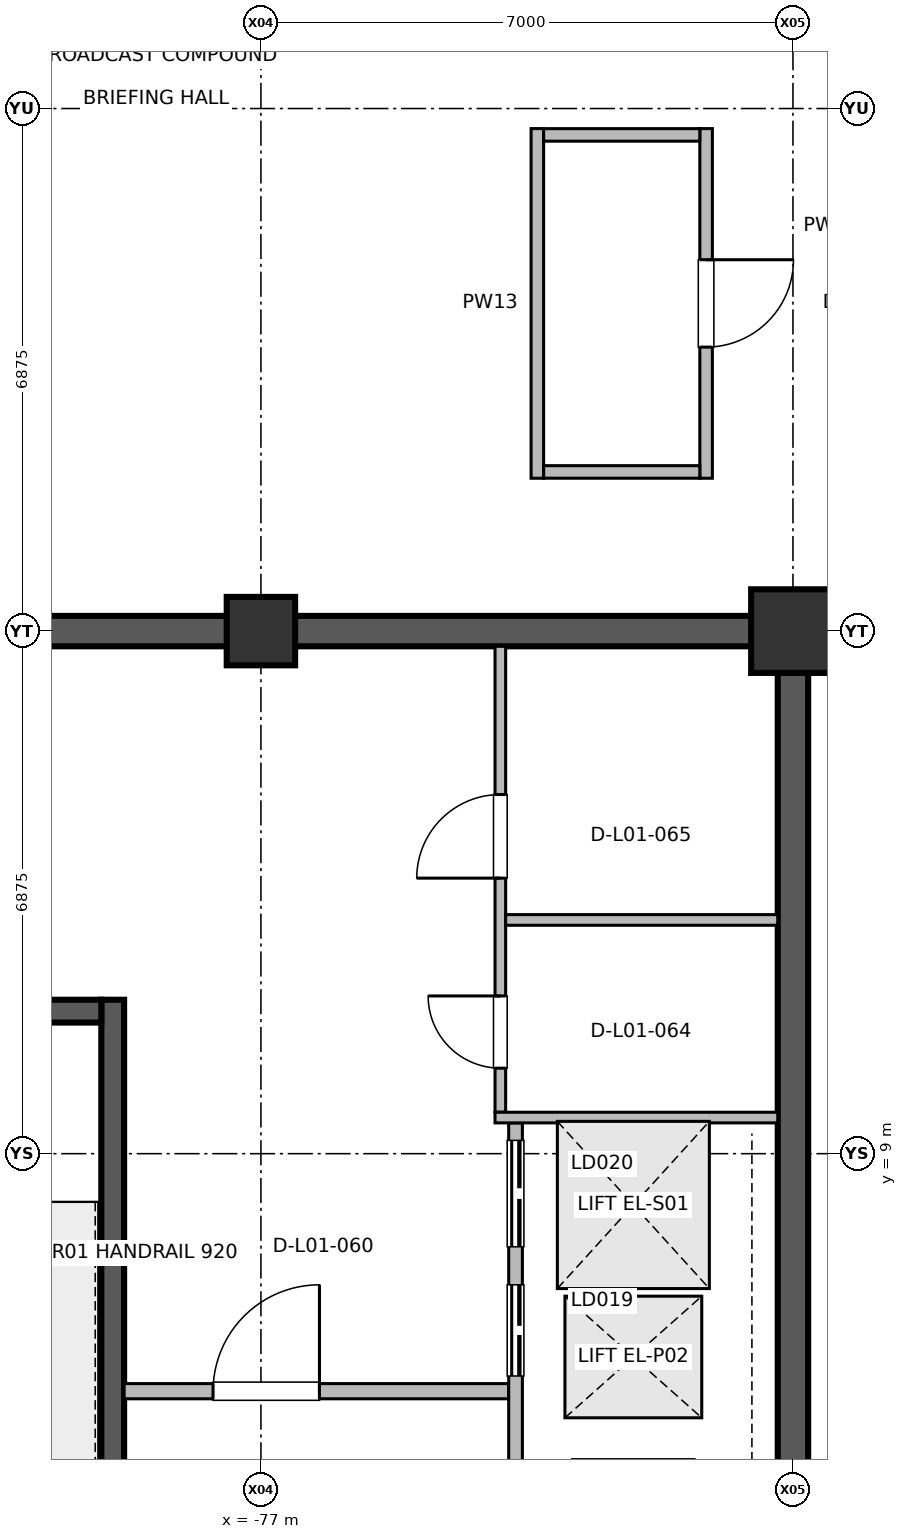
"""IFC4 building model, lengths in metres.
Left out: names, types, materials, properties, quantities, classifications, styles, units other than length and angle.
Written with IfcOpenShell. Run it as: python <this file> out.ifc"""

import sys

from ifc_helpers import new_model, si_unit, direction, frame, frame_2d, origin, origin_2d, place, context, subcontext, project, spatial, rectangle, extrude, element, fill, save


model = new_model("IFC4")
c1 = context("Model", 3, precision=1e-05, world=origin(), true_north=direction((0.0, 1.0)))
c2 = subcontext(c1, "Body", "Model", "MODEL_VIEW")
j1 = project(units=[si_unit("LENGTHUNIT", "METRE"), si_unit("PLANEANGLEUNIT", "RADIAN")], contexts=[c1])
p1 = place(None, origin())
s1 = spatial("IfcSite", under=j1, at=p1, CompositionType="ELEMENT")
p2 = place(p1, origin())
s2 = spatial("IfcBuilding", under=s1, at=p2, CompositionType="ELEMENT")
p3 = place(p2, origin())
s3 = spatial("IfcBuildingStorey", under=s2, at=p3, CompositionType="ELEMENT", Elevation=0.0)
p4 = place(p3, frame((-77.0, 15.875, 0.0), z_axis=(0.0, 0.0, 1.0), x_axis=(1.0, 0.0, 0.0)))
e1 = element("IfcColumn", 1, at=p4, inside=s3, PredefinedType="COLUMN", context=c2, shape_type="SweptSolid", body=[
    extrude(rectangle(XDim=0.9, YDim=0.9, at=origin_2d()), origin(), (0.0, 0.0, 1.0), 5.998),
])
p5 = place(p3, frame((-70.0, 15.875, 0.0), z_axis=(0.0, 0.0, 1.0), x_axis=(1.0, 0.0, 0.0)))
e2 = element("IfcColumn", 2, at=p5, inside=s3, PredefinedType="COLUMN", context=c2, shape_type="SweptSolid", body=[
    extrude(rectangle(XDim=1.1, YDim=1.1, at=origin_2d()), origin(), (0.0, 0.0, 1.0), 5.998),
])
p6 = place(p3, frame((-70.0, 2.325, 0.0), z_axis=(0.0, 0.0, 1.0), x_axis=(0.0, 1.0, 0.0)))
e3 = element("IfcWall", 3, at=p6, inside=s3, PredefinedType="SHEAR", context=c2, shape_type="SweptSolid", body=[
    extrude(rectangle(XDim=13.35, YDim=0.4, at=frame_2d((6.675, 0.0))), origin(), (0.0, 0.0, 1.0), 5.78),
])
p7 = place(p3, frame((-83.8, 15.875, 0.0), z_axis=(0.0, 0.0, 1.0), x_axis=(1.0, 0.0, 0.0)))
e4 = element("IfcWall", 4, at=p7, inside=s3, PredefinedType="SHEAR", context=c2, shape_type="SweptSolid", body=[
    extrude(rectangle(XDim=13.6, YDim=0.4, at=frame_2d((6.8, 0.0))), origin(), (0.0, 0.0, 1.0), 5.78),
])
p8 = place(p3, frame((-78.95, 2.325, 0.0), z_axis=(0.0, 0.0, 1.0), x_axis=(0.0, 1.0, 0.0)))
e5 = element("IfcWall", 5, at=p8, inside=s3, PredefinedType="SHEAR", context=c2, shape_type="SweptSolid", body=[
    extrude(rectangle(XDim=8.7, YDim=0.3, at=frame_2d((4.35, 0.0))), origin(), (0.0, 0.0, 1.0), 5.78),
])
p9 = place(p8, frame((0.37, 0.0, 0.0)))
e6 = element("IfcOpeningElement", 6, at=p9, cuts=e5, PredefinedType="OPENING", context=c2, shape_type="SweptSolid", body=[
    extrude(rectangle(XDim=1.45, YDim=2.2, at=frame_2d((0.725, 1.1))), frame((0.0, 0.16, 0.0), z_axis=(0.0, -1.0, 0.0), x_axis=(1.0, 0.0, 0.0)), (0.0, 0.0, 1.0), 0.32),
])
p10 = place(p3, frame((-78.8, 5.875, 0.0), z_axis=(0.0, 0.0, 1.0), x_axis=(1.0, 0.0, 0.0)))
e7 = element("IfcWall", 7, at=p10, inside=s3, PredefinedType="PARTITIONING", context=c2, shape_type="SweptSolid", body=[
    extrude(rectangle(XDim=5.06, YDim=0.2, at=frame_2d((2.53, 0.0))), origin(), (0.0, 0.0, 1.0), 4.555),
])
p11 = place(p10, frame((1.17, 0.0, 0.0)))
e8 = element("IfcOpeningElement", 8, at=p11, cuts=e7, PredefinedType="OPENING", context=c2, shape_type="SweptSolid", body=[
    extrude(rectangle(XDim=1.4, YDim=2.2, at=frame_2d((0.7, 1.1))), frame((0.0, 0.11, 0.0), z_axis=(0.0, -1.0, 0.0), x_axis=(1.0, 0.0, 0.0)), (0.0, 0.0, 1.0), 0.22),
])
p12 = place(p3, frame((-73.65, 2.325, 0.0), z_axis=(0.0, 0.0, 1.0), x_axis=(0.0, 1.0, 0.0)))
e9 = element("IfcWall", 9, at=p12, inside=s3, PredefinedType="PARTITIONING", context=c2, shape_type="SweptSolid", body=[
    extrude(rectangle(XDim=7.08, YDim=0.18, at=frame_2d((3.54, 0.0))), origin(), (0.0, 0.0, 1.0), 5.02),
])
p13 = place(p12, frame((1.0, 0.0, 0.0)))
e10 = element("IfcOpeningElement", 10, at=p13, cuts=e9, PredefinedType="OPENING", context=c2, shape_type="SweptSolid", body=[
    extrude(rectangle(XDim=1.1, YDim=2.2, at=frame_2d((0.55, 1.1))), frame((0.0, 0.1, 0.0), z_axis=(0.0, -1.0, 0.0), x_axis=(1.0, 0.0, 0.0)), (0.0, 0.0, 1.0), 0.2),
])
p14 = place(p12, frame((3.75, 0.0, 0.0)))
e11 = element("IfcOpeningElement", 11, at=p14, cuts=e9, PredefinedType="OPENING", context=c2, shape_type="SweptSolid", body=[
    extrude(rectangle(XDim=1.2, YDim=2.25, at=frame_2d((0.6, 1.125))), frame((0.0, 0.1, 0.0), z_axis=(0.0, -1.0, 0.0), x_axis=(1.0, 0.0, 0.0)), (0.0, 0.0, 1.0), 0.2),
])
p15 = place(p12, frame((5.45, 0.0, 0.0)))
e12 = element("IfcOpeningElement", 12, at=p15, cuts=e9, PredefinedType="OPENING", context=c2, shape_type="SweptSolid", body=[
    extrude(rectangle(XDim=1.4, YDim=2.3, at=frame_2d((0.7, 1.15))), frame((0.0, 0.1, 0.0), z_axis=(0.0, -1.0, 0.0), x_axis=(1.0, 0.0, 0.0)), (0.0, 0.0, 1.0), 0.2),
])
p16 = place(p3, frame((-73.85, 9.545, 0.0), z_axis=(0.0, 0.0, 1.0), x_axis=(0.0, 1.0, 0.0)))
e13 = element("IfcWall", 13, at=p16, inside=s3, PredefinedType="PARTITIONING", context=c2, shape_type="SweptSolid", body=[
    extrude(rectangle(XDim=6.13, YDim=0.14, at=frame_2d((3.065, 0.0))), origin(), (0.0, 0.0, 1.0), 5.02),
])
p17 = place(p16, frame((0.58, 0.0, 0.0)))
e14 = element("IfcOpeningElement", 14, at=p17, cuts=e13, PredefinedType="OPENING", context=c2, shape_type="SweptSolid", body=[
    extrude(rectangle(XDim=0.95, YDim=2.15, at=frame_2d((0.475, 1.075))), frame((0.0, 0.08, 0.0), z_axis=(0.0, -1.0, 0.0), x_axis=(1.0, 0.0, 0.0)), (0.0, 0.0, 1.0), 0.16),
])
p18 = place(p16, frame((3.08, 0.0, 0.0)))
e15 = element("IfcOpeningElement", 15, at=p18, cuts=e13, PredefinedType="OPENING", context=c2, shape_type="SweptSolid", body=[
    extrude(rectangle(XDim=1.1, YDim=2.15, at=frame_2d((0.55, 1.075))), frame((0.0, 0.08, 0.0), z_axis=(0.0, -1.0, 0.0), x_axis=(1.0, 0.0, 0.0)), (0.0, 0.0, 1.0), 0.16),
])
p19 = place(p3, frame((-71.143, 22.486, 0.0), z_axis=(0.0, 0.0, 1.0), x_axis=(0.0, -1.0, 0.0)))
e16 = element("IfcWall", 16, at=p19, inside=s3, PredefinedType="PARTITIONING", context=c2, shape_type="SweptSolid", body=[
    extrude(rectangle(XDim=4.6, YDim=0.165, at=frame_2d((2.3, 0.0))), origin(), (0.0, 0.0, 1.0), 5.02),
])
p20 = place(p19, frame((1.725, 0.0, 0.0)))
e17 = element("IfcOpeningElement", 17, at=p20, cuts=e16, PredefinedType="OPENING", context=c2, shape_type="SweptSolid", body=[
    extrude(rectangle(XDim=1.15, YDim=2.2, at=frame_2d((0.575, 1.1))), frame((0.0, 0.093, 0.0), z_axis=(0.0, -1.0, 0.0), x_axis=(1.0, 0.0, 0.0)), (0.0, 0.0, 1.0), 0.185),
])
p21 = place(p3, frame((-73.92, 9.475, 0.0), z_axis=(0.0, 0.0, 1.0), x_axis=(1.0, 0.0, 0.0)))
e18 = element("IfcWall", 18, at=p21, inside=s3, PredefinedType="PARTITIONING", context=c2, shape_type="SweptSolid", body=[
    extrude(rectangle(XDim=3.72, YDim=0.14, at=frame_2d((1.86, 0.0))), origin(), (0.0, 0.0, 1.0), 5.02),
])
p22 = place(p3, frame((-73.78, 12.075, 0.0), z_axis=(0.0, 0.0, 1.0), x_axis=(1.0, 0.0, 0.0)))
e19 = element("IfcWall", 19, at=p22, inside=s3, PredefinedType="PARTITIONING", context=c2, shape_type="SweptSolid", body=[
    extrude(rectangle(XDim=3.58, YDim=0.14, at=frame_2d((1.79, 0.0))), origin(), (0.0, 0.0, 1.0), 5.02),
])
p23 = place(p3, frame((-73.363, 17.886, 0.0), z_axis=(0.0, 0.0, 1.0), x_axis=(0.0, 1.0, 0.0)))
e20 = element("IfcWall", 20, at=p23, inside=s3, PredefinedType="PARTITIONING", context=c2, shape_type="SweptSolid", body=[
    extrude(rectangle(XDim=4.6, YDim=0.165, at=frame_2d((2.3, 0.0))), origin(), (0.0, 0.0, 1.0), 5.02),
])
for number, where, z_axis, x_axis in (
    (21, (-73.28, 17.969, 0.0), (0.0, 0.0, 1.0), (1.0, 0.0, 0.0)),
    (22, (-73.28, 22.403, 0.0), (0.0, 0.0, 1.0), (1.0, 0.0, 0.0)),
):
    element("IfcWall", number, at=place(p3, frame(where, z_axis=z_axis, x_axis=x_axis)), inside=s3, PredefinedType="PARTITIONING", context=c2, shape_type="SweptSolid", body=[
        extrude(rectangle(XDim=2.054, YDim=0.165, at=frame_2d((1.027, 0.0))), origin(), (0.0, 0.0, 1.0), 5.02),
    ])
p24 = place(p3, frame((-83.8, 10.875, 0.0), z_axis=(0.0, 0.0, 1.0), x_axis=(1.0, 0.0, 0.0)))
e23 = element("IfcWall", 23, at=p24, inside=s3, PredefinedType="SHEAR", context=c2, shape_type="SweptSolid", body=[
    extrude(rectangle(XDim=4.7, YDim=0.3, at=frame_2d((2.35, 0.0))), origin(), (0.0, 0.0, 1.0), 5.78),
])
p25 = place(p11, origin())
e24 = element("IfcDoor", 24, at=p25, inside=s3, OperationType="SINGLE_SWING_RIGHT", PredefinedType="DOOR", context=c2, shape_type="SweptSolid", body=[
    extrude(rectangle(XDim=1.4, YDim=2.2, at=frame_2d((0.7, 1.1))), frame((0.0, 0.025, 0.0), z_axis=(0.0, -1.0, 0.0), x_axis=(1.0, 0.0, 0.0)), (0.0, 0.0, 1.0), 0.05),
])
fill(e8, e24)
p26 = place(p14, origin())
e25 = element("IfcDoor", 25, at=p26, inside=s3, OperationType="DOUBLE_DOOR_SLIDING", PredefinedType="DOOR", context=c2, shape_type="SweptSolid", body=[
    extrude(rectangle(XDim=1.2, YDim=2.25, at=frame_2d((0.6, 1.125))), frame((0.0, 0.025, 0.0), z_axis=(0.0, -1.0, 0.0), x_axis=(1.0, 0.0, 0.0)), (0.0, 0.0, 1.0), 0.05),
])
fill(e11, e25)
p27 = place(p15, origin())
e26 = element("IfcDoor", 26, at=p27, inside=s3, OperationType="DOUBLE_DOOR_SLIDING", PredefinedType="DOOR", context=c2, shape_type="SweptSolid", body=[
    extrude(rectangle(XDim=1.4, YDim=2.3, at=frame_2d((0.7, 1.15))), frame((0.0, 0.025, 0.0), z_axis=(0.0, -1.0, 0.0), x_axis=(1.0, 0.0, 0.0)), (0.0, 0.0, 1.0), 0.05),
])
fill(e12, e26)
p28 = place(p17, origin())
e27 = element("IfcDoor", 27, at=p28, inside=s3, OperationType="SINGLE_SWING_RIGHT", PredefinedType="DOOR", context=c2, shape_type="SweptSolid", body=[
    extrude(rectangle(XDim=0.95, YDim=2.15, at=frame_2d((0.475, 1.075))), frame((0.0, 0.025, 0.0), z_axis=(0.0, -1.0, 0.0), x_axis=(1.0, 0.0, 0.0)), (0.0, 0.0, 1.0), 0.05),
])
fill(e14, e27)
p29 = place(p18, origin())
e28 = element("IfcDoor", 28, at=p29, inside=s3, OperationType="SINGLE_SWING_LEFT", PredefinedType="DOOR", context=c2, shape_type="SweptSolid", body=[
    extrude(rectangle(XDim=1.1, YDim=2.15, at=frame_2d((0.55, 1.075))), frame((0.0, 0.025, 0.0), z_axis=(0.0, -1.0, 0.0), x_axis=(1.0, 0.0, 0.0)), (0.0, 0.0, 1.0), 0.05),
])
fill(e15, e28)
p30 = place(p20, origin())
e29 = element("IfcDoor", 29, at=p30, inside=s3, OperationType="SINGLE_SWING_LEFT", PredefinedType="DOOR", context=c2, shape_type="SweptSolid", body=[
    extrude(rectangle(XDim=1.15, YDim=2.2, at=frame_2d((0.575, 1.1))), frame((0.0, 0.025, 0.0), z_axis=(0.0, -1.0, 0.0), x_axis=(1.0, 0.0, 0.0)), (0.0, 0.0, 1.0), 0.05),
])
fill(e17, e29)
save(model, sys.argv[1])
